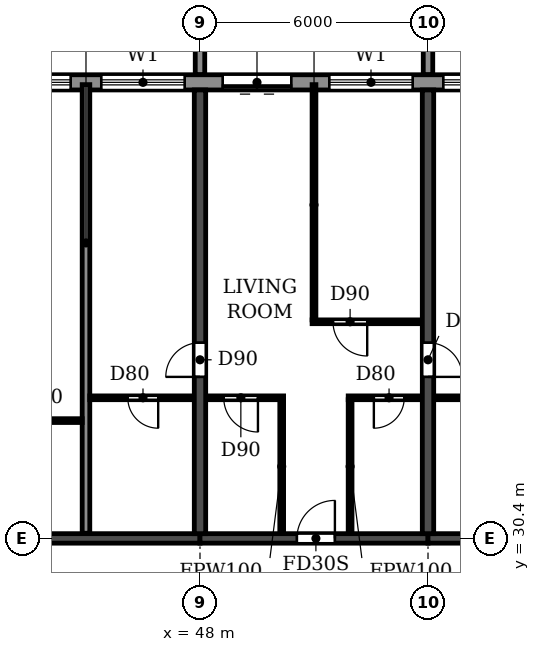
"""IFC4 building model, lengths in metres.
Left out: names, types, materials, properties, quantities, classifications, styles, units other than length and angle.
Written with IfcOpenShell. Run it as: python <this file> out.ifc"""

import sys

from ifc_helpers import new_model, si_unit, direction, frame, frame_2d, origin, place, context, subcontext, project, spatial, polyline, rectangle, outline, extrude, source, transform, mapped, element, fill, save


model = new_model("IFC4")
c1 = context("Model", 3, precision=1e-05, world=origin(), true_north=direction((0.0, 1.0)))
c2 = subcontext(c1, "Body", "Model", "MODEL_VIEW")
j1 = project(units=[si_unit("LENGTHUNIT", "METRE"), si_unit("PLANEANGLEUNIT", "RADIAN")], contexts=[c1])
p1 = place(None, origin())
s1 = spatial("IfcSite", under=j1, at=p1, CompositionType="ELEMENT")
p2 = place(p1, origin())
s2 = spatial("IfcBuilding", under=s1, at=p2, CompositionType="ELEMENT")
p3 = place(p2, frame((0.0, 0.0, 125.7)))
s3 = spatial("IfcBuildingStorey", under=s2, at=p3, CompositionType="ELEMENT", Elevation=125.7)
p4 = place(p3, frame((48.0, 30.525, 0.0), z_axis=(0.0, 0.0, 1.0), x_axis=(0.0, 1.0, 0.0)))
e1 = element("IfcWall", 1, at=p4, inside=s3, PredefinedType="SHEAR", context=c2, shape_type="SweptSolid", body=[
    extrude(rectangle(XDim=11.675, YDim=0.3, at=frame_2d((5.837, 0.0))), origin(), (0.0, 0.0, 1.0), 3.07),
])
p5 = place(p4, frame((4.125, 0.0, 0.0)))
e2 = element("IfcOpeningElement", 2, at=p5, cuts=e1, PredefinedType="OPENING", context=c2, shape_type="SweptSolid", body=[
    extrude(rectangle(XDim=0.9, YDim=2.1, at=frame_2d((0.45, 1.05))), frame((0.0, 0.16, 0.0), z_axis=(0.0, -1.0, 0.0), x_axis=(1.0, 0.0, 0.0)), (0.0, 0.0, 1.0), 0.32),
])
p6 = place(p3, frame((54.0, 30.525, 0.0), z_axis=(0.0, 0.0, 1.0), x_axis=(0.0, 1.0, 0.0)))
e3 = element("IfcWall", 3, at=p6, inside=s3, PredefinedType="SHEAR", context=c2, shape_type="SweptSolid", body=[
    extrude(rectangle(XDim=11.675, YDim=0.3, at=frame_2d((5.837, 0.0))), origin(), (0.0, 0.0, 1.0), 3.07),
])
p7 = place(p6, frame((4.125, 0.0, 0.0)))
e4 = element("IfcOpeningElement", 4, at=p7, cuts=e3, PredefinedType="OPENING", context=c2, shape_type="SweptSolid", body=[
    extrude(rectangle(XDim=0.9, YDim=2.1, at=frame_2d((0.45, 1.05))), frame((0.0, 0.16, 0.0), z_axis=(0.0, -1.0, 0.0), x_axis=(1.0, 0.0, 0.0)), (0.0, 0.0, 1.0), 0.32),
])
p8 = place(p3, frame((42.0, 30.4, 0.0), z_axis=(0.0, 0.0, 1.0), x_axis=(1.0, 0.0, 0.0)))
e5 = element("IfcWall", 5, at=p8, inside=s3, PredefinedType="SHEAR", context=c2, shape_type="SweptSolid", body=[
    extrude(rectangle(XDim=6.0, YDim=0.25, at=frame_2d((3.0, 0.0))), origin(), (0.0, 0.0, 1.0), 2.47),
])
p9 = place(p3, frame((48.0, 30.4, 0.0), z_axis=(0.0, 0.0, 1.0), x_axis=(1.0, 0.0, 0.0)))
e6 = element("IfcWall", 6, at=p9, inside=s3, PredefinedType="SHEAR", context=c2, shape_type="SweptSolid", body=[
    extrude(rectangle(XDim=6.0, YDim=0.25, at=frame_2d((3.0, 0.0))), origin(), (0.0, 0.0, 1.0), 2.47),
])
p10 = place(p9, frame((2.55, 0.0, 0.0)))
e7 = element("IfcOpeningElement", 7, at=p10, cuts=e6, PredefinedType="OPENING", context=c2, shape_type="SweptSolid", body=[
    extrude(rectangle(XDim=1.0, YDim=2.1, at=frame_2d((0.5, 1.05))), frame((0.0, 0.135, 0.0), z_axis=(0.0, -1.0, 0.0), x_axis=(1.0, 0.0, 0.0)), (0.0, 0.0, 1.0), 0.27),
])
p11 = place(p3, frame((54.0, 30.4, 0.0), z_axis=(0.0, 0.0, 1.0), x_axis=(1.0, 0.0, 0.0)))
e8 = element("IfcWall", 8, at=p11, inside=s3, PredefinedType="SHEAR", context=c2, shape_type="SweptSolid", body=[
    extrude(rectangle(XDim=6.0, YDim=0.25, at=frame_2d((3.0, 0.0))), origin(), (0.0, 0.0, 1.0), 2.47),
])
p12 = place(p3, frame((85.317, 42.4, 0.0), z_axis=(0.0, 0.0, 1.0), x_axis=(-1.0, 0.0, 0.0)))
e9 = element("IfcWall", 9, at=p12, inside=s3, PredefinedType="STANDARD", context=c2, shape_type="SweptSolid", body=[
    extrude(rectangle(XDim=68.634, YDim=0.4, at=frame_2d((34.317, 0.0))), origin(), (0.0, 0.0, 1.0), 3.07),
])
p13 = place(p12, frame((64.717, 0.0, 0.9)))
e10 = element("IfcOpeningElement", 10, at=p13, cuts=e9, PredefinedType="OPENING", context=c2, shape_type="SweptSolid", body=[
    extrude(rectangle(XDim=2.2, YDim=1.5, at=frame_2d((1.1, 0.75))), frame((0.0, 0.21, 0.0), z_axis=(0.0, -1.0, 0.0), x_axis=(1.0, 0.0, 0.0)), (0.0, 0.0, 1.0), 0.42),
])
p14 = place(p12, frame((61.917, 0.0, 0.0)))
e11 = element("IfcOpeningElement", 11, at=p14, cuts=e9, PredefinedType="OPENING", context=c2, shape_type="SweptSolid", body=[
    extrude(rectangle(XDim=1.8, YDim=2.4, at=frame_2d((0.9, 1.2))), frame((0.0, 0.21, 0.0), z_axis=(0.0, -1.0, 0.0), x_axis=(1.0, 0.0, 0.0)), (0.0, 0.0, 1.0), 0.42),
])
p15 = place(p12, frame((58.717, 0.0, 0.9)))
e12 = element("IfcOpeningElement", 12, at=p15, cuts=e9, PredefinedType="OPENING", context=c2, shape_type="SweptSolid", body=[
    extrude(rectangle(XDim=2.2, YDim=1.5, at=frame_2d((1.1, 0.75))), frame((0.0, 0.21, 0.0), z_axis=(0.0, -1.0, 0.0), x_axis=(1.0, 0.0, 0.0)), (0.0, 0.0, 1.0), 0.42),
])
p16 = place(p12, frame((55.917, 0.0, 0.0)))
e13 = element("IfcOpeningElement", 13, at=p16, cuts=e9, PredefinedType="OPENING", context=c2, shape_type="SweptSolid", body=[
    extrude(rectangle(XDim=1.8, YDim=2.4, at=frame_2d((0.9, 1.2))), frame((0.0, 0.21, 0.0), z_axis=(0.0, -1.0, 0.0), x_axis=(1.0, 0.0, 0.0)), (0.0, 0.0, 1.0), 0.42),
])
p17 = place(p12, frame((52.717, 0.0, 0.9)))
e14 = element("IfcOpeningElement", 14, at=p17, cuts=e9, PredefinedType="OPENING", context=c2, shape_type="SweptSolid", body=[
    extrude(rectangle(XDim=2.2, YDim=1.5, at=frame_2d((1.1, 0.75))), frame((0.0, 0.21, 0.0), z_axis=(0.0, -1.0, 0.0), x_axis=(1.0, 0.0, 0.0)), (0.0, 0.0, 1.0), 0.42),
])
p18 = place(p12, frame((49.917, 0.0, 0.0)))
e15 = element("IfcOpeningElement", 15, at=p18, cuts=e9, PredefinedType="OPENING", context=c2, shape_type="SweptSolid", body=[
    extrude(rectangle(XDim=1.8, YDim=2.4, at=frame_2d((0.9, 1.2))), frame((0.0, 0.21, 0.0), z_axis=(0.0, -1.0, 0.0), x_axis=(1.0, 0.0, 0.0)), (0.0, 0.0, 1.0), 0.42),
])
p19 = place(p12, frame((46.717, 0.0, 0.9)))
e16 = element("IfcOpeningElement", 16, at=p19, cuts=e9, PredefinedType="OPENING", context=c2, shape_type="SweptSolid", body=[
    extrude(rectangle(XDim=2.2, YDim=1.5, at=frame_2d((1.1, 0.75))), frame((0.0, 0.21, 0.0), z_axis=(0.0, -1.0, 0.0), x_axis=(1.0, 0.0, 0.0)), (0.0, 0.0, 1.0), 0.42),
])
p20 = place(p12, frame((43.917, 0.0, 0.0)))
e17 = element("IfcOpeningElement", 17, at=p20, cuts=e9, PredefinedType="OPENING", context=c2, shape_type="SweptSolid", body=[
    extrude(rectangle(XDim=1.8, YDim=2.4, at=frame_2d((0.9, 1.2))), frame((0.0, 0.21, 0.0), z_axis=(0.0, -1.0, 0.0), x_axis=(1.0, 0.0, 0.0)), (0.0, 0.0, 1.0), 0.42),
])
p21 = place(p12, frame((40.717, 0.0, 0.9)))
e18 = element("IfcOpeningElement", 18, at=p21, cuts=e9, PredefinedType="OPENING", context=c2, shape_type="SweptSolid", body=[
    extrude(rectangle(XDim=2.2, YDim=1.5, at=frame_2d((1.1, 0.75))), frame((0.0, 0.21, 0.0), z_axis=(0.0, -1.0, 0.0), x_axis=(1.0, 0.0, 0.0)), (0.0, 0.0, 1.0), 0.42),
])
p22 = place(p12, frame((37.717, 0.0, 0.9)))
e19 = element("IfcOpeningElement", 19, at=p22, cuts=e9, PredefinedType="OPENING", context=c2, shape_type="SweptSolid", body=[
    extrude(rectangle(XDim=2.2, YDim=1.5, at=frame_2d((1.1, 0.75))), frame((0.0, 0.21, 0.0), z_axis=(0.0, -1.0, 0.0), x_axis=(1.0, 0.0, 0.0)), (0.0, 0.0, 1.0), 0.42),
])
p23 = place(p12, frame((34.917, 0.0, 0.0)))
e20 = element("IfcOpeningElement", 20, at=p23, cuts=e9, PredefinedType="OPENING", context=c2, shape_type="SweptSolid", body=[
    extrude(rectangle(XDim=1.8, YDim=2.4, at=frame_2d((0.9, 1.2))), frame((0.0, 0.21, 0.0), z_axis=(0.0, -1.0, 0.0), x_axis=(1.0, 0.0, 0.0)), (0.0, 0.0, 1.0), 0.42),
])
p24 = place(p12, frame((31.717, 0.0, 0.9)))
e21 = element("IfcOpeningElement", 21, at=p24, cuts=e9, PredefinedType="OPENING", context=c2, shape_type="SweptSolid", body=[
    extrude(rectangle(XDim=2.2, YDim=1.5, at=frame_2d((1.1, 0.75))), frame((0.0, 0.21, 0.0), z_axis=(0.0, -1.0, 0.0), x_axis=(1.0, 0.0, 0.0)), (0.0, 0.0, 1.0), 0.42),
])
p25 = place(p12, frame((28.717, 0.0, 0.9)))
e22 = element("IfcOpeningElement", 22, at=p25, cuts=e9, PredefinedType="OPENING", context=c2, shape_type="SweptSolid", body=[
    extrude(rectangle(XDim=2.2, YDim=1.5, at=frame_2d((1.1, 0.75))), frame((0.0, 0.21, 0.0), z_axis=(0.0, -1.0, 0.0), x_axis=(1.0, 0.0, 0.0)), (0.0, 0.0, 1.0), 0.42),
])
p26 = place(p12, frame((25.717, 0.0, 0.9)))
e23 = element("IfcOpeningElement", 23, at=p26, cuts=e9, PredefinedType="OPENING", context=c2, shape_type="SweptSolid", body=[
    extrude(rectangle(XDim=2.2, YDim=1.5, at=frame_2d((1.1, 0.75))), frame((0.0, 0.21, 0.0), z_axis=(0.0, -1.0, 0.0), x_axis=(1.0, 0.0, 0.0)), (0.0, 0.0, 1.0), 0.42),
])
p27 = place(p12, frame((22.717, 0.0, 0.9)))
e24 = element("IfcOpeningElement", 24, at=p27, cuts=e9, PredefinedType="OPENING", context=c2, shape_type="SweptSolid", body=[
    extrude(rectangle(XDim=2.2, YDim=1.5, at=frame_2d((1.1, 0.75))), frame((0.0, 0.21, 0.0), z_axis=(0.0, -1.0, 0.0), x_axis=(1.0, 0.0, 0.0)), (0.0, 0.0, 1.0), 0.42),
])
p28 = place(p12, frame((19.917, 0.0, 0.0)))
e25 = element("IfcOpeningElement", 25, at=p28, cuts=e9, PredefinedType="OPENING", context=c2, shape_type="SweptSolid", body=[
    extrude(rectangle(XDim=1.8, YDim=2.4, at=frame_2d((0.9, 1.2))), frame((0.0, 0.21, 0.0), z_axis=(0.0, -1.0, 0.0), x_axis=(1.0, 0.0, 0.0)), (0.0, 0.0, 1.0), 0.42),
])
p29 = place(p12, frame((16.917, 0.0, 0.0)))
e26 = element("IfcOpeningElement", 26, at=p29, cuts=e9, PredefinedType="OPENING", context=c2, shape_type="SweptSolid", body=[
    extrude(rectangle(XDim=1.8, YDim=2.4, at=frame_2d((0.9, 1.2))), frame((0.0, 0.21, 0.0), z_axis=(0.0, -1.0, 0.0), x_axis=(1.0, 0.0, 0.0)), (0.0, 0.0, 1.0), 0.42),
])
p30 = place(p12, frame((13.717, 0.0, 0.9)))
e27 = element("IfcOpeningElement", 27, at=p30, cuts=e9, PredefinedType="OPENING", context=c2, shape_type="SweptSolid", body=[
    extrude(rectangle(XDim=2.2, YDim=1.5, at=frame_2d((1.1, 0.75))), frame((0.0, 0.21, 0.0), z_axis=(0.0, -1.0, 0.0), x_axis=(1.0, 0.0, 0.0)), (0.0, 0.0, 1.0), 0.42),
])
p31 = place(p12, frame((10.717, 0.0, 0.9)))
e28 = element("IfcOpeningElement", 28, at=p31, cuts=e9, PredefinedType="OPENING", context=c2, shape_type="SweptSolid", body=[
    extrude(rectangle(XDim=2.2, YDim=1.5, at=frame_2d((1.1, 0.75))), frame((0.0, 0.21, 0.0), z_axis=(0.0, -1.0, 0.0), x_axis=(1.0, 0.0, 0.0)), (0.0, 0.0, 1.0), 0.42),
])
p32 = place(p12, frame((7.717, 0.0, 0.9)))
e29 = element("IfcOpeningElement", 29, at=p32, cuts=e9, PredefinedType="OPENING", context=c2, shape_type="SweptSolid", body=[
    extrude(rectangle(XDim=2.2, YDim=1.5, at=frame_2d((1.1, 0.75))), frame((0.0, 0.21, 0.0), z_axis=(0.0, -1.0, 0.0), x_axis=(1.0, 0.0, 0.0)), (0.0, 0.0, 1.0), 0.42),
])
p33 = place(p12, frame((4.917, 0.0, 0.0)))
e30 = element("IfcOpeningElement", 30, at=p33, cuts=e9, PredefinedType="OPENING", context=c2, shape_type="SweptSolid", body=[
    extrude(rectangle(XDim=1.8, YDim=2.4, at=frame_2d((0.9, 1.2))), frame((0.0, 0.21, 0.0), z_axis=(0.0, -1.0, 0.0), x_axis=(1.0, 0.0, 0.0)), (0.0, 0.0, 1.0), 0.42),
])
p34 = place(p12, frame((1.717, 0.0, 0.9)))
e31 = element("IfcOpeningElement", 31, at=p34, cuts=e9, PredefinedType="OPENING", context=c2, shape_type="SweptSolid", body=[
    extrude(rectangle(XDim=2.2, YDim=1.5, at=frame_2d((1.1, 0.75))), frame((0.0, 0.21, 0.0), z_axis=(0.0, -1.0, 0.0), x_axis=(1.0, 0.0, 0.0)), (0.0, 0.0, 1.0), 0.42),
])
m1 = source(origin(), c2, "Body", "SweptSolid", [
    extrude(outline(polyline([(0.0, 0.0), (0.25, 0.0), (0.25, 3.1), (0.0, 3.1), (0.0, 0.0)])), origin(), (0.0, 0.0, 1.0), 3.1),
])
for number, where in (
    (32, (47.875, 42.6, 0.0)),
    (33, (53.875, 42.6, 0.0)),
):
    element("IfcWall", number, at=place(p3, frame(where)), inside=s3, PredefinedType="STANDARD", context=c2, shape_type="MappedRepresentation", body=[
        mapped(m1, transform((0.0, 0.0, 0.0))),
    ])
p35 = place(p3, frame((45.0, 30.535, 0.0), z_axis=(0.0, 0.0, 1.0), x_axis=(0.0, 1.0, 0.0)))
e34 = element("IfcWall", 34, at=p35, inside=s3, PredefinedType="PARTITIONING", context=c2, shape_type="SweptSolid", body=[
    extrude(rectangle(XDim=11.805, YDim=0.2, at=frame_2d((5.903, 0.0))), origin(), (0.0, 0.0, 1.0), 3.07),
])
p36 = place(p3, frame((42.16, 33.5, 0.0), z_axis=(0.0, 0.0, 1.0), x_axis=(1.0, 0.0, 0.0)))
e35 = element("IfcWall", 35, at=p36, inside=s3, PredefinedType="PARTITIONING", context=c2, shape_type="SweptSolid", body=[
    extrude(rectangle(XDim=2.74, YDim=0.1, at=frame_2d((1.37, 0.0))), origin(), (0.0, 0.0, 1.0), 3.07),
])
p37 = place(p36, frame((0.94, 0.0, 0.0)))
e36 = element("IfcOpeningElement", 36, at=p37, cuts=e35, PredefinedType="OPENING", context=c2, shape_type="SweptSolid", body=[
    extrude(rectangle(XDim=0.8, YDim=2.1, at=frame_2d((0.4, 1.05))), frame((0.0, 0.06, 0.0), z_axis=(0.0, -1.0, 0.0), x_axis=(1.0, 0.0, 0.0)), (0.0, 0.0, 1.0), 0.12),
])
p38 = place(p3, frame((45.1, 34.1, 0.0), z_axis=(0.0, 0.0, 1.0), x_axis=(1.0, 0.0, 0.0)))
e37 = element("IfcWall", 37, at=p38, inside=s3, PredefinedType="PARTITIONING", context=c2, shape_type="SweptSolid", body=[
    extrude(rectangle(XDim=2.74, YDim=0.1, at=frame_2d((1.37, 0.0))), origin(), (0.0, 0.0, 1.0), 3.07),
])
p39 = place(p38, frame((1.0, 0.0, 0.0)))
e38 = element("IfcOpeningElement", 38, at=p39, cuts=e37, PredefinedType="OPENING", context=c2, shape_type="SweptSolid", body=[
    extrude(rectangle(XDim=0.8, YDim=2.1, at=frame_2d((0.4, 1.05))), frame((0.0, 0.06, 0.0), z_axis=(0.0, -1.0, 0.0), x_axis=(1.0, 0.0, 0.0)), (0.0, 0.0, 1.0), 0.12),
])
p40 = place(p3, frame((48.16, 34.1, 0.0), z_axis=(0.0, 0.0, 1.0), x_axis=(1.0, 0.0, 0.0)))
e39 = element("IfcWall", 39, at=p40, inside=s3, PredefinedType="PARTITIONING", context=c2, shape_type="SweptSolid", body=[
    extrude(rectangle(XDim=2.04, YDim=0.1, at=frame_2d((1.02, 0.0))), origin(), (0.0, 0.0, 1.0), 3.07),
])
p41 = place(p40, frame((0.465, 0.0, 0.0)))
e40 = element("IfcOpeningElement", 40, at=p41, cuts=e39, PredefinedType="OPENING", context=c2, shape_type="SweptSolid", body=[
    extrude(rectangle(XDim=0.9, YDim=2.1, at=frame_2d((0.45, 1.05))), frame((0.0, 0.06, 0.0), z_axis=(0.0, -1.0, 0.0), x_axis=(1.0, 0.0, 0.0)), (0.0, 0.0, 1.0), 0.12),
])
p42 = place(p3, frame((51.9, 34.1, 0.0), z_axis=(0.0, 0.0, 1.0), x_axis=(1.0, 0.0, 0.0)))
e41 = element("IfcWall", 41, at=p42, inside=s3, PredefinedType="PARTITIONING", context=c2, shape_type="SweptSolid", body=[
    extrude(rectangle(XDim=1.94, YDim=0.1, at=frame_2d((0.97, 0.0))), origin(), (0.0, 0.0, 1.0), 3.07),
])
p43 = place(p42, frame((0.675, 0.0, 0.0)))
e42 = element("IfcOpeningElement", 42, at=p43, cuts=e41, PredefinedType="OPENING", context=c2, shape_type="SweptSolid", body=[
    extrude(rectangle(XDim=0.8, YDim=2.1, at=frame_2d((0.4, 1.05))), frame((0.0, 0.06, 0.0), z_axis=(0.0, -1.0, 0.0), x_axis=(1.0, 0.0, 0.0)), (0.0, 0.0, 1.0), 0.12),
])
p44 = place(p3, frame((54.16, 34.1, 0.0), z_axis=(0.0, 0.0, 1.0), x_axis=(1.0, 0.0, 0.0)))
e43 = element("IfcWall", 43, at=p44, inside=s3, PredefinedType="PARTITIONING", context=c2, shape_type="SweptSolid", body=[
    extrude(rectangle(XDim=2.74, YDim=0.1, at=frame_2d((1.37, 0.0))), origin(), (0.0, 0.0, 1.0), 3.07),
])
p45 = place(p44, frame((0.94, 0.0, 0.0)))
e44 = element("IfcOpeningElement", 44, at=p45, cuts=e43, PredefinedType="OPENING", context=c2, shape_type="SweptSolid", body=[
    extrude(rectangle(XDim=0.8, YDim=2.1, at=frame_2d((0.4, 1.05))), frame((0.0, 0.06, 0.0), z_axis=(0.0, -1.0, 0.0), x_axis=(1.0, 0.0, 0.0)), (0.0, 0.0, 1.0), 0.12),
])
p46 = place(p3, frame((50.95, 36.1, 0.0), z_axis=(0.0, 0.0, 1.0), x_axis=(1.0, 0.0, 0.0)))
e45 = element("IfcWall", 45, at=p46, inside=s3, PredefinedType="PARTITIONING", context=c2, shape_type="SweptSolid", body=[
    extrude(rectangle(XDim=2.89, YDim=0.1, at=frame_2d((1.445, 0.0))), origin(), (0.0, 0.0, 1.0), 3.07),
])
p47 = place(p46, frame((0.55, 0.0, 0.0)))
e46 = element("IfcOpeningElement", 46, at=p47, cuts=e45, PredefinedType="OPENING", context=c2, shape_type="SweptSolid", body=[
    extrude(rectangle(XDim=0.9, YDim=2.1, at=frame_2d((0.45, 1.05))), frame((0.0, 0.06, 0.0), z_axis=(0.0, -1.0, 0.0), x_axis=(1.0, 0.0, 0.0)), (0.0, 0.0, 1.0), 0.12),
])
p48 = place(p3, frame((50.15, 30.535, 0.0), z_axis=(0.0, 0.0, 1.0), x_axis=(0.0, 1.0, 0.0)))
e47 = element("IfcWall", 47, at=p48, inside=s3, PredefinedType="PARTITIONING", context=c2, shape_type="SweptSolid", body=[
    extrude(rectangle(XDim=3.515, YDim=0.1, at=frame_2d((1.758, 0.0))), origin(), (0.0, 0.0, 1.0), 3.07),
])
p49 = place(p3, frame((51.0, 36.15, 0.0), z_axis=(0.0, 0.0, 1.0), x_axis=(0.0, 1.0, 0.0)))
e48 = element("IfcWall", 48, at=p49, inside=s3, PredefinedType="PARTITIONING", context=c2, shape_type="SweptSolid", body=[
    extrude(rectangle(XDim=6.19, YDim=0.1, at=frame_2d((3.095, 0.0))), origin(), (0.0, 0.0, 1.0), 3.07),
])
p50 = place(p3, frame((51.95, 30.535, 0.0), z_axis=(0.0, 0.0, 1.0), x_axis=(0.0, 1.0, 0.0)))
e49 = element("IfcWall", 49, at=p50, inside=s3, PredefinedType="PARTITIONING", context=c2, shape_type="SweptSolid", body=[
    extrude(rectangle(XDim=3.515, YDim=0.1, at=frame_2d((1.758, 0.0))), origin(), (0.0, 0.0, 1.0), 3.07),
])
p51 = place(p21, origin())
e50 = element("IfcWindow", 50, at=p51, inside=s3, PartitioningType="DOUBLE_PANEL_HORIZONTAL", PredefinedType="WINDOW", context=c2, shape_type="SweptSolid", body=[
    extrude(rectangle(XDim=2.2, YDim=1.5, at=frame_2d((1.1, 0.75))), frame((0.0, 0.03, 0.0), z_axis=(0.0, -1.0, 0.0), x_axis=(1.0, 0.0, 0.0)), (0.0, 0.0, 1.0), 0.06),
])
fill(e18, e50)
p52 = place(p22, origin())
e51 = element("IfcWindow", 51, at=p52, inside=s3, PartitioningType="DOUBLE_PANEL_HORIZONTAL", PredefinedType="WINDOW", context=c2, shape_type="SweptSolid", body=[
    extrude(rectangle(XDim=2.2, YDim=1.5, at=frame_2d((1.1, 0.75))), frame((0.0, 0.03, 0.0), z_axis=(0.0, -1.0, 0.0), x_axis=(1.0, 0.0, 0.0)), (0.0, 0.0, 1.0), 0.06),
])
fill(e19, e51)
p53 = place(p23, origin())
e52 = element("IfcDoor", 52, at=p53, inside=s3, OperationType="DOUBLE_DOOR_SLIDING", PredefinedType="DOOR", context=c2, shape_type="SweptSolid", body=[
    extrude(rectangle(XDim=1.8, YDim=2.4, at=frame_2d((0.9, 1.2))), frame((0.0, 0.025, 0.0), z_axis=(0.0, -1.0, 0.0), x_axis=(1.0, 0.0, 0.0)), (0.0, 0.0, 1.0), 0.05),
])
fill(e20, e52)
p54 = place(p24, origin())
e53 = element("IfcWindow", 53, at=p54, inside=s3, PartitioningType="DOUBLE_PANEL_HORIZONTAL", PredefinedType="WINDOW", context=c2, shape_type="SweptSolid", body=[
    extrude(rectangle(XDim=2.2, YDim=1.5, at=frame_2d((1.1, 0.75))), frame((0.0, 0.03, 0.0), z_axis=(0.0, -1.0, 0.0), x_axis=(1.0, 0.0, 0.0)), (0.0, 0.0, 1.0), 0.06),
])
fill(e21, e53)
p55 = place(p25, origin())
e54 = element("IfcWindow", 54, at=p55, inside=s3, PartitioningType="DOUBLE_PANEL_HORIZONTAL", PredefinedType="WINDOW", context=c2, shape_type="SweptSolid", body=[
    extrude(rectangle(XDim=2.2, YDim=1.5, at=frame_2d((1.1, 0.75))), frame((0.0, 0.03, 0.0), z_axis=(0.0, -1.0, 0.0), x_axis=(1.0, 0.0, 0.0)), (0.0, 0.0, 1.0), 0.06),
])
fill(e22, e54)
p56 = place(p39, frame((0.8, 0.0, 0.0), z_axis=(0.0, 0.0, 1.0), x_axis=(-1.0, 0.0, 0.0)))
e55 = element("IfcDoor", 55, at=p56, inside=s3, OperationType="SINGLE_SWING_LEFT", PredefinedType="DOOR", context=c2, shape_type="SweptSolid", body=[
    extrude(rectangle(XDim=0.8, YDim=2.1, at=frame_2d((0.4, 1.05))), frame((0.0, 0.025, 0.0), z_axis=(0.0, -1.0, 0.0), x_axis=(1.0, 0.0, 0.0)), (0.0, 0.0, 1.0), 0.05),
])
fill(e38, e55)
p57 = place(p5, origin())
e56 = element("IfcDoor", 56, at=p57, inside=s3, OperationType="SINGLE_SWING_LEFT", PredefinedType="DOOR", context=c2, shape_type="SweptSolid", body=[
    extrude(rectangle(XDim=0.9, YDim=2.1, at=frame_2d((0.45, 1.05))), frame((0.0, 0.025, 0.0), z_axis=(0.0, -1.0, 0.0), x_axis=(1.0, 0.0, 0.0)), (0.0, 0.0, 1.0), 0.05),
])
fill(e2, e56)
p58 = place(p41, frame((0.9, 0.0, 0.0), z_axis=(0.0, 0.0, 1.0), x_axis=(-1.0, 0.0, 0.0)))
e57 = element("IfcDoor", 57, at=p58, inside=s3, OperationType="SINGLE_SWING_LEFT", PredefinedType="DOOR", context=c2, shape_type="SweptSolid", body=[
    extrude(rectangle(XDim=0.9, YDim=2.1, at=frame_2d((0.45, 1.05))), frame((0.0, 0.025, 0.0), z_axis=(0.0, -1.0, 0.0), x_axis=(1.0, 0.0, 0.0)), (0.0, 0.0, 1.0), 0.05),
])
fill(e40, e57)
p59 = place(p10, origin())
e58 = element("IfcDoor", 58, at=p59, inside=s3, OperationType="SINGLE_SWING_RIGHT", PredefinedType="DOOR", context=c2, shape_type="SweptSolid", body=[
    extrude(rectangle(XDim=1.0, YDim=2.1, at=frame_2d((0.5, 1.05))), frame((0.0, 0.025, 0.0), z_axis=(0.0, -1.0, 0.0), x_axis=(1.0, 0.0, 0.0)), (0.0, 0.0, 1.0), 0.05),
])
fill(e7, e58)
p60 = place(p47, frame((0.9, 0.0, 0.0), z_axis=(0.0, 0.0, 1.0), x_axis=(-1.0, 0.0, 0.0)))
e59 = element("IfcDoor", 59, at=p60, inside=s3, OperationType="SINGLE_SWING_LEFT", PredefinedType="DOOR", context=c2, shape_type="SweptSolid", body=[
    extrude(rectangle(XDim=0.9, YDim=2.1, at=frame_2d((0.45, 1.05))), frame((0.0, 0.025, 0.0), z_axis=(0.0, -1.0, 0.0), x_axis=(1.0, 0.0, 0.0)), (0.0, 0.0, 1.0), 0.05),
])
fill(e46, e59)
p61 = place(p43, frame((0.8, 0.0, 0.0), z_axis=(0.0, 0.0, 1.0), x_axis=(-1.0, 0.0, 0.0)))
e60 = element("IfcDoor", 60, at=p61, inside=s3, OperationType="SINGLE_SWING_RIGHT", PredefinedType="DOOR", context=c2, shape_type="SweptSolid", body=[
    extrude(rectangle(XDim=0.8, YDim=2.1, at=frame_2d((0.4, 1.05))), frame((0.0, 0.025, 0.0), z_axis=(0.0, -1.0, 0.0), x_axis=(1.0, 0.0, 0.0)), (0.0, 0.0, 1.0), 0.05),
])
fill(e42, e60)
p62 = place(p7, frame((0.9, 0.0, 0.0), z_axis=(0.0, 0.0, 1.0), x_axis=(-1.0, 0.0, 0.0)))
e61 = element("IfcDoor", 61, at=p62, inside=s3, OperationType="SINGLE_SWING_RIGHT", PredefinedType="DOOR", context=c2, shape_type="SweptSolid", body=[
    extrude(rectangle(XDim=0.9, YDim=2.1, at=frame_2d((0.45, 1.05))), frame((0.0, 0.025, 0.0), z_axis=(0.0, -1.0, 0.0), x_axis=(1.0, 0.0, 0.0)), (0.0, 0.0, 1.0), 0.05),
])
fill(e4, e61)
save(model, sys.argv[1])
